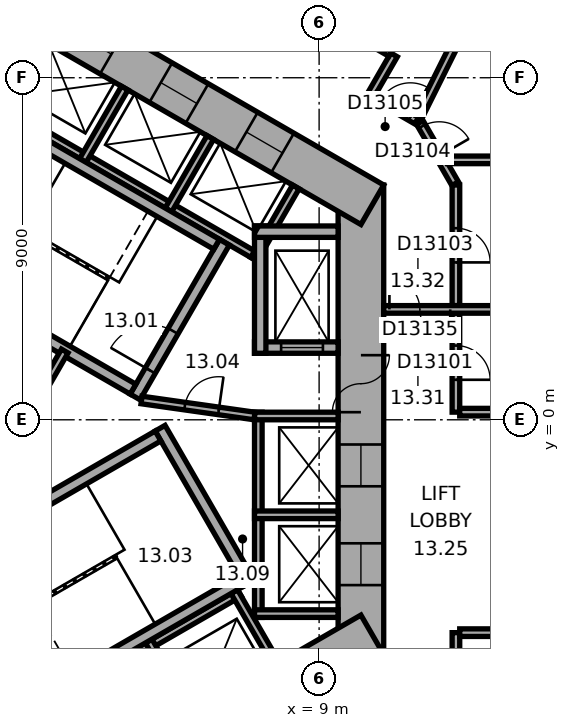
"""IFC4 building model, lengths in metres.
Left out: names, types, materials, properties, quantities, classifications, styles, units other than length and angle.
Written with IfcOpenShell. Run it as: python <this file> out.ifc"""

import sys

from ifc_helpers import new_model, si_unit, direction, frame, frame_2d, origin, place, context, subcontext, project, spatial, rectangle, extrude, element, fill, save


model = new_model("IFC4")
c1 = context("Model", 3, precision=1e-05, world=origin(), true_north=direction((0.0, 1.0)))
c2 = subcontext(c1, "Body", "Model", "MODEL_VIEW")
j1 = project(units=[si_unit("LENGTHUNIT", "METRE"), si_unit("PLANEANGLEUNIT", "RADIAN")], contexts=[c1])
p1 = place(None, origin())
s1 = spatial("IfcSite", under=j1, at=p1, CompositionType="ELEMENT")
p2 = place(p1, origin())
s2 = spatial("IfcBuilding", under=s1, at=p2, CompositionType="ELEMENT")
p3 = place(p2, frame((0.0, 0.0, 63.8)))
s3 = spatial("IfcBuildingStorey", under=s2, at=p3, CompositionType="ELEMENT", Elevation=63.8)
p4 = place(p3, frame((10.1, -6.177, 0.0), z_axis=(0.0, 0.0, 1.0), x_axis=(0.0, 1.0, 0.0)))
e1 = element("IfcWall", 1, at=p4, inside=s3, PredefinedType="SHEAR", context=c2, shape_type="SweptSolid", body=[
    extrude(rectangle(XDim=12.355, YDim=1.2, at=frame_2d((6.177, 0.0))), origin(), (0.0, 0.0, 1.0), 3.3),
])
p5 = place(p4, frame((6.378, 0.0, 0.0)))
e2 = element("IfcOpeningElement", 2, at=p5, cuts=e1, PredefinedType="OPENING", context=c2, shape_type="SweptSolid", body=[
    extrude(rectangle(XDim=1.5, YDim=2.1, at=frame_2d((0.75, 1.05))), frame((0.0, 0.61, 0.0), z_axis=(0.0, -1.0, 0.0), x_axis=(1.0, 0.0, 0.0)), (0.0, 0.0, 1.0), 1.22),
])
p6 = place(p4, frame((1.828, 0.0, 0.0)))
e3 = element("IfcOpeningElement", 3, at=p6, cuts=e1, PredefinedType="OPENING", context=c2, shape_type="SweptSolid", body=[
    extrude(rectangle(XDim=1.1, YDim=2.1, at=frame_2d((0.55, 1.05))), frame((0.0, 0.61, 0.0), z_axis=(0.0, -1.0, 0.0), x_axis=(1.0, 0.0, 0.0)), (0.0, 0.0, 1.0), 1.22),
])
p7 = place(p4, frame((4.427, 0.0, 0.0)))
e4 = element("IfcOpeningElement", 4, at=p7, cuts=e1, PredefinedType="OPENING", context=c2, shape_type="SweptSolid", body=[
    extrude(rectangle(XDim=1.1, YDim=2.1, at=frame_2d((0.55, 1.05))), frame((0.0, 0.61, 0.0), z_axis=(0.0, -1.0, 0.0), x_axis=(1.0, 0.0, 0.0)), (0.0, 0.0, 1.0), 1.22),
])
p8 = place(p3, frame((10.4, 5.658, 0.0), z_axis=(0.0, 0.0, 1.0), x_axis=(-0.866021384402, 0.500006961711, 0.0)))
e5 = element("IfcWall", 5, at=p8, inside=s3, PredefinedType="SHEAR", context=c2, shape_type="SweptSolid", body=[
    extrude(rectangle(XDim=12.355, YDim=1.2, at=frame_2d((6.178, 0.0))), origin(), (0.0, 0.0, 1.0), 3.3),
])
p9 = place(p8, frame((2.728, 0.0, 0.0)))
e6 = element("IfcOpeningElement", 6, at=p9, cuts=e5, PredefinedType="OPENING", context=c2, shape_type="SweptSolid", body=[
    extrude(rectangle(XDim=1.1, YDim=2.1, at=frame_2d((0.55, 1.05))), frame((0.0, 0.61, 0.0), z_axis=(0.0, -1.0, 0.0), x_axis=(1.0, 0.0, 0.0)), (0.0, 0.0, 1.0), 1.22),
])
p10 = place(p8, frame((5.328, 0.0, 0.0)))
e7 = element("IfcOpeningElement", 7, at=p10, cuts=e5, PredefinedType="OPENING", context=c2, shape_type="SweptSolid", body=[
    extrude(rectangle(XDim=1.1, YDim=2.1, at=frame_2d((0.55, 1.05))), frame((0.0, 0.61, 0.0), z_axis=(0.0, -1.0, 0.0), x_axis=(1.0, 0.0, 0.0)), (0.0, 0.0, 1.0), 1.22),
])
p11 = place(p8, frame((7.928, 0.0, 0.0)))
e8 = element("IfcOpeningElement", 8, at=p11, cuts=e5, PredefinedType="OPENING", context=c2, shape_type="SweptSolid", body=[
    extrude(rectangle(XDim=1.1, YDim=2.1, at=frame_2d((0.55, 1.05))), frame((0.0, 0.61, 0.0), z_axis=(0.0, -1.0, 0.0), x_axis=(1.0, 0.0, 0.0)), (0.0, 0.0, 1.0), 1.22),
])
p12 = place(p3, frame((-0.3, -11.836, 0.0), z_axis=(0.0, 0.0, 1.0), x_axis=(0.866021384402, 0.500006961711, 0.0)))
e9 = element("IfcWall", 9, at=p12, inside=s3, PredefinedType="SHEAR", context=c2, shape_type="SweptSolid", body=[
    extrude(rectangle(XDim=12.355, YDim=1.2, at=frame_2d((6.178, 0.0))), origin(), (0.0, 0.0, 1.0), 3.3),
])
p13 = place(p12, frame((4.128, 0.0, 0.0)))
e10 = element("IfcOpeningElement", 10, at=p13, cuts=e9, PredefinedType="OPENING", context=c2, shape_type="SweptSolid", body=[
    extrude(rectangle(XDim=0.9, YDim=2.1, at=frame_2d((0.45, 1.05))), frame((0.0, 0.61, 0.0), z_axis=(0.0, -1.0, 0.0), x_axis=(1.0, 0.0, 0.0)), (0.0, 0.0, 1.0), 1.22),
])
p14 = place(p12, frame((7.928, 0.0, 0.0)))
e11 = element("IfcOpeningElement", 11, at=p14, cuts=e9, PredefinedType="OPENING", context=c2, shape_type="SweptSolid", body=[
    extrude(rectangle(XDim=1.1, YDim=2.1, at=frame_2d((0.55, 1.05))), frame((0.0, 0.61, 0.0), z_axis=(0.0, -1.0, 0.0), x_axis=(1.0, 0.0, 0.0)), (0.0, 0.0, 1.0), 1.22),
])
p15 = place(p3, frame((7.4, -5.2, 0.0), z_axis=(0.0, 0.0, 1.0), x_axis=(0.0, 1.0, 0.0)))
e12 = element("IfcWall", 12, at=p15, inside=s3, PredefinedType="PARTITIONING", context=c2, shape_type="SweptSolid", body=[
    extrude(rectangle(XDim=5.4, YDim=0.2, at=frame_2d((2.7, 0.0))), origin(), (0.0, 0.0, 1.0), 3.05),
])
for number, where, z_axis, x_axis in (
    (13, (7.3, -5.1, 0.0), (0.0, 0.0, 1.0), (1.0, 0.0, 0.0)),
    (14, (7.3, -2.5, 0.0), (0.0, 0.0, 1.0), (1.0, 0.0, 0.0)),
    (15, (7.3, 0.1, 0.0), (0.0, 0.0, 1.0), (1.0, 0.0, 0.0)),
):
    element("IfcWall", number, at=place(p3, frame(where, z_axis=z_axis, x_axis=x_axis)), inside=s3, PredefinedType="PARTITIONING", context=c2, shape_type="SweptSolid", body=[
        extrude(rectangle(XDim=2.2, YDim=0.2, at=frame_2d((1.1, 0.0))), origin(), (0.0, 0.0, 1.0), 3.05),
    ])
p16 = place(p3, frame((7.424, 4.259, 0.0), z_axis=(0.0, 0.0, 1.0), x_axis=(-0.866026010844, 0.49999894854, 0.0)))
e16 = element("IfcWall", 16, at=p16, inside=s3, PredefinedType="PARTITIONING", context=c2, shape_type="SweptSolid", body=[
    extrude(rectangle(XDim=8.0, YDim=0.2, at=frame_2d((4.0, 0.0))), origin(), (0.0, 0.0, 1.0), 3.05),
])
for number, where, z_axis, x_axis in (
    (17, (7.287, 4.222, 0.0), (0.0, 0.0, 1.0), (0.5, 0.866, 0.0)),
    (18, (5.036, 5.522, 0.0), (0.0, 0.0, 1.0), (0.5, 0.866, 0.0)),
    (19, (2.784, 6.822, 0.0), (0.0, 0.0, 1.0), (0.5, 0.866, 0.0)),
):
    element("IfcWall", number, at=place(p3, frame(where, z_axis=z_axis, x_axis=x_axis)), inside=s3, PredefinedType="PARTITIONING", context=c2, shape_type="SweptSolid", body=[
        extrude(rectangle(XDim=2.2, YDim=0.2, at=frame_2d((1.1, 0.0))), origin(), (0.0, 0.0, 1.0), 3.05),
    ])
p17 = place(p3, frame((-0.024, -8.559, 0.0), z_axis=(0.0, 0.0, 1.0), x_axis=(0.866026010844, 0.49999894854, 0.0)))
e20 = element("IfcWall", 20, at=p17, inside=s3, PredefinedType="PARTITIONING", context=c2, shape_type="SweptSolid", body=[
    extrude(rectangle(XDim=8.0, YDim=0.2, at=frame_2d((4.0, 0.0))), origin(), (0.0, 0.0, 1.0), 3.05),
])
for number, where, z_axis, x_axis in (
    (21, (4.516, -5.822, 0.0), (0.0, 0.0, 1.0), (0.5, -0.866, 0.0)),
    (22, (6.768, -4.522, 0.0), (0.0, 0.0, 1.0), (0.5, -0.866, 0.0)),
):
    element("IfcWall", number, at=place(p3, frame(where, z_axis=z_axis, x_axis=x_axis)), inside=s3, PredefinedType="PARTITIONING", context=c2, shape_type="SweptSolid", body=[
        extrude(rectangle(XDim=2.2, YDim=0.2, at=frame_2d((1.1, 0.0))), origin(), (0.0, 0.0, 1.0), 3.05),
    ])
p18 = place(p3, frame((4.158, 0.602, 0.0), z_axis=(0.0, 0.0, 1.0), x_axis=(0.499977259774, 0.866038532462, 0.0)))
e23 = element("IfcWall", 23, at=p18, inside=s3, PredefinedType="SHEAR", context=c2, shape_type="SweptSolid", body=[
    extrude(rectangle(XDim=4.7, YDim=0.3, at=frame_2d((2.35, 0.0))), origin(), (0.0, 0.0, 1.0), 3.05),
])
p19 = place(p18, frame((0.8, 0.0, 0.0)))
e24 = element("IfcOpeningElement", 24, at=p19, cuts=e23, PredefinedType="OPENING", context=c2, shape_type="SweptSolid", body=[
    extrude(rectangle(XDim=1.2, YDim=2.1, at=frame_2d((0.6, 1.05))), frame((0.0, 0.16, 0.0), z_axis=(0.0, -1.0, 0.0), x_axis=(1.0, 0.0, 0.0)), (0.0, 0.0, 1.0), 0.32),
])
for number, where, z_axis, x_axis in (
    (25, (4.103, 0.807, 0.0), (0.0, 0.0, 1.0), (-0.866, 0.5, 0.0)),
    (26, (6.303, 4.617, 0.0), (0.0, 0.0, 1.0), (-0.866, 0.5, 0.0)),
):
    element("IfcWall", number, at=place(p3, frame(where, z_axis=z_axis, x_axis=x_axis)), inside=s3, PredefinedType="SHEAR", context=c2, shape_type="SweptSolid", body=[
        extrude(rectangle(XDim=7.06, YDim=0.3, at=frame_2d((3.53, 0.0))), origin(), (0.0, 0.0, 1.0), 3.05),
    ])
p20 = place(p3, frame((4.816, -0.222, 0.0), z_axis=(0.0, 0.0, 1.0), x_axis=(0.499977259774, -0.866038532462, 0.0)))
e27 = element("IfcWall", 27, at=p20, inside=s3, PredefinedType="SHEAR", context=c2, shape_type="SweptSolid", body=[
    extrude(rectangle(XDim=4.7, YDim=0.3, at=frame_2d((2.35, 0.0))), origin(), (0.0, 0.0, 1.0), 3.05),
])
for number, where, z_axis, x_axis in (
    (28, (-1.353, -3.957, 0.0), (0.0, 0.0, 1.0), (0.866, 0.5, 0.0)),
    (29, (0.847, -7.767, 0.0), (0.0, 0.0, 1.0), (0.866, 0.5, 0.0)),
):
    element("IfcWall", number, at=place(p3, frame(where, z_axis=z_axis, x_axis=x_axis)), inside=s3, PredefinedType="SHEAR", context=c2, shape_type="SweptSolid", body=[
        extrude(rectangle(XDim=7.06, YDim=0.3, at=frame_2d((3.53, 0.0))), origin(), (0.0, 0.0, 1.0), 3.05),
    ])
p21 = place(p3, frame((7.3, 1.9, 0.0), z_axis=(0.0, 0.0, 1.0), x_axis=(1.0, 0.0, 0.0)))
e30 = element("IfcWall", 30, at=p21, inside=s3, PredefinedType="SHEAR", context=c2, shape_type="SweptSolid", body=[
    extrude(rectangle(XDim=2.2, YDim=0.3, at=frame_2d((1.1, 0.0))), origin(), (0.0, 0.0, 1.0), 3.05),
])
p22 = place(p21, frame((0.7, 0.0, 0.0)))
e31 = element("IfcOpeningElement", 31, at=p22, cuts=e30, PredefinedType="OPENING", context=c2, shape_type="SweptSolid", body=[
    extrude(rectangle(XDim=1.1, YDim=2.1, at=frame_2d((0.55, 1.05))), frame((0.0, 0.16, 0.0), z_axis=(0.0, -1.0, 0.0), x_axis=(1.0, 0.0, 0.0)), (0.0, 0.0, 1.0), 0.32),
])
p23 = place(p3, frame((7.45, 1.75, 0.0), z_axis=(0.0, 0.0, 1.0), x_axis=(0.0, 1.0, 0.0)))
e32 = element("IfcWall", 32, at=p23, inside=s3, PredefinedType="SHEAR", context=c2, shape_type="SweptSolid", body=[
    extrude(rectangle(XDim=3.35, YDim=0.3, at=frame_2d((1.675, 0.0))), origin(), (0.0, 0.0, 1.0), 3.05),
])
p24 = place(p3, frame((7.3, 4.95, 0.0), z_axis=(0.0, 0.0, 1.0), x_axis=(1.0, 0.0, 0.0)))
e33 = element("IfcWall", 33, at=p24, inside=s3, PredefinedType="SHEAR", context=c2, shape_type="SweptSolid", body=[
    extrude(rectangle(XDim=2.2, YDim=0.3, at=frame_2d((1.1, 0.0))), origin(), (0.0, 0.0, 1.0), 3.05),
])
p25 = place(p3, frame((4.327, 0.521, 0.0), z_axis=(0.0, 0.0, 1.0), x_axis=(0.990124376366, -0.14019172346, 0.0)))
e34 = element("IfcWall", 34, at=p25, inside=s3, PredefinedType="PARTITIONING", context=c2, shape_type="SweptSolid", body=[
    extrude(rectangle(XDim=3.002, YDim=0.2, at=frame_2d((1.501, 0.0))), origin(), (0.0, 0.0, 1.0), 3.05),
])
p26 = place(p25, frame((1.15, 0.0, 0.0)))
e35 = element("IfcOpeningElement", 35, at=p26, cuts=e34, PredefinedType="OPENING", context=c2, shape_type="SweptSolid", body=[
    extrude(rectangle(XDim=0.9, YDim=2.1, at=frame_2d((0.45, 1.05))), frame((0.0, 0.11, 0.0), z_axis=(0.0, -1.0, 0.0), x_axis=(1.0, 0.0, 0.0)), (0.0, 0.0, 1.0), 0.22),
])
p27 = place(p3, frame((0.74, -0.904, 0.0), z_axis=(0.0, 0.0, 1.0), x_axis=(0.500028278809, 0.866009076391, 0.0)))
e36 = element("IfcWall", 36, at=p27, inside=s3, PredefinedType="PARTITIONING", context=c2, shape_type="SweptSolid", body=[
    extrude(rectangle(XDim=3.133, YDim=0.2, at=frame_2d((1.566, 0.0))), origin(), (0.0, 0.0, 1.0), 3.05),
])
p28 = place(p3, frame((10.371, 8.561, 0.0), z_axis=(0.0, 0.0, 1.0), x_axis=(0.499986357472, 0.866033280158, 0.0)))
e37 = element("IfcWall", 37, at=p28, inside=s3, PredefinedType="PARTITIONING", context=c2, shape_type="SweptSolid", body=[
    extrude(rectangle(XDim=1.201, YDim=0.2, at=frame_2d((0.601, 0.0))), origin(), (0.0, 0.0, 1.0), 3.05),
])
p29 = place(p3, frame((10.885, 9.652, 0.0), z_axis=(0.0, 0.0, 1.0), x_axis=(-0.866033868542, 0.499985338323, 0.0)))
e38 = element("IfcWall", 38, at=p29, inside=s3, PredefinedType="PARTITIONING", context=c2, shape_type="SweptSolid", body=[
    extrude(rectangle(XDim=8.602, YDim=0.2, at=frame_2d((4.301, 0.0))), origin(), (0.0, 0.0, 1.0), 3.05),
])
p30 = place(p29, frame((5.302, 0.0, 0.0)))
e39 = element("IfcOpeningElement", 39, at=p30, cuts=e38, PredefinedType="OPENING", context=c2, shape_type="SweptSolid", body=[
    extrude(rectangle(XDim=0.9, YDim=2.1, at=frame_2d((0.45, 1.05))), frame((0.0, 0.11, 0.0), z_axis=(0.0, -1.0, 0.0), x_axis=(1.0, 0.0, 0.0)), (0.0, 0.0, 1.0), 0.22),
])
p31 = place(p3, frame((11.566, 7.871, 0.0), z_axis=(0.0, 0.0, 1.0), x_axis=(-0.866004557827, 0.500036104519, 0.0)))
e40 = element("IfcWall", 40, at=p31, inside=s3, PredefinedType="PARTITIONING", context=c2, shape_type="SweptSolid", body=[
    extrude(rectangle(XDim=1.28, YDim=0.2, at=frame_2d((0.64, 0.0))), origin(), (0.0, 0.0, 1.0), 3.05),
])
p32 = place(p31, frame((0.19, 0.0, 0.0)))
e41 = element("IfcOpeningElement", 41, at=p32, cuts=e40, PredefinedType="OPENING", context=c2, shape_type="SweptSolid", body=[
    extrude(rectangle(XDim=0.9, YDim=2.1, at=frame_2d((0.45, 1.05))), frame((0.0, 0.11, 0.0), z_axis=(0.0, -1.0, 0.0), x_axis=(1.0, 0.0, 0.0)), (0.0, 0.0, 1.0), 0.22),
])
p33 = place(p3, frame((12.58, 6.212, 0.0), z_axis=(0.0, 0.0, 1.0), x_axis=(-0.500063286585, 0.865988862174, 0.0)))
e42 = element("IfcWall", 42, at=p33, inside=s3, PredefinedType="PARTITIONING", context=c2, shape_type="SweptSolid", body=[
    extrude(rectangle(XDim=1.86, YDim=0.2, at=frame_2d((0.93, 0.0))), origin(), (0.0, 0.0, 1.0), 3.05),
])
p34 = place(p33, frame((0.842, 0.0, 0.0)))
e43 = element("IfcOpeningElement", 43, at=p34, cuts=e42, PredefinedType="OPENING", context=c2, shape_type="SweptSolid", body=[
    extrude(rectangle(XDim=0.9, YDim=2.1, at=frame_2d((0.45, 1.05))), frame((0.0, 0.11, 0.0), z_axis=(0.0, -1.0, 0.0), x_axis=(1.0, 0.0, 0.0)), (0.0, 0.0, 1.0), 0.22),
])
p35 = place(p3, frame((12.6, -6.138, 0.0), z_axis=(0.0, 0.0, 1.0), x_axis=(0.0, 1.0, 0.0)))
e44 = element("IfcWall", 44, at=p35, inside=s3, PredefinedType="PARTITIONING", context=c2, shape_type="SweptSolid", body=[
    extrude(rectangle(XDim=0.537, YDim=0.2, at=frame_2d((0.268, 0.0))), origin(), (0.0, 0.0, 1.0), 3.05),
])
p36 = place(p3, frame((12.6, 0.201, 0.0), z_axis=(0.0, 0.0, 1.0), x_axis=(0.0, 1.0, 0.0)))
e45 = element("IfcWall", 45, at=p36, inside=s3, PredefinedType="PARTITIONING", context=c2, shape_type="SweptSolid", body=[
    extrude(rectangle(XDim=2.604, YDim=0.2, at=frame_2d((1.302, 0.0))), origin(), (0.0, 0.0, 1.0), 3.05),
])
p37 = place(p36, frame((0.852, 0.0, 0.0)))
e46 = element("IfcOpeningElement", 46, at=p37, cuts=e45, PredefinedType="OPENING", context=c2, shape_type="SweptSolid", body=[
    extrude(rectangle(XDim=0.9, YDim=2.1, at=frame_2d((0.45, 1.05))), frame((0.0, 0.11, 0.0), z_axis=(0.0, -1.0, 0.0), x_axis=(1.0, 0.0, 0.0)), (0.0, 0.0, 1.0), 0.22),
])
p38 = place(p3, frame((12.6, 3.004, 0.0), z_axis=(0.0, 0.0, 1.0), x_axis=(0.0, 1.0, 0.0)))
e47 = element("IfcWall", 47, at=p38, inside=s3, PredefinedType="PARTITIONING", context=c2, shape_type="SweptSolid", body=[
    extrude(rectangle(XDim=3.173, YDim=0.2, at=frame_2d((1.586, 0.0))), origin(), (0.0, 0.0, 1.0), 3.05),
])
p39 = place(p38, frame((1.136, 0.0, 0.0)))
e48 = element("IfcOpeningElement", 48, at=p39, cuts=e47, PredefinedType="OPENING", context=c2, shape_type="SweptSolid", body=[
    extrude(rectangle(XDim=0.9, YDim=2.1, at=frame_2d((0.45, 1.05))), frame((0.0, 0.11, 0.0), z_axis=(0.0, -1.0, 0.0), x_axis=(1.0, 0.0, 0.0)), (0.0, 0.0, 1.0), 0.22),
])
p40 = place(p3, frame((12.7, -5.601, 0.0), z_axis=(0.0, 0.0, 1.0), x_axis=(1.0, 0.0, 0.0)))
e49 = element("IfcWall", 49, at=p40, inside=s3, PredefinedType="PARTITIONING", context=c2, shape_type="SweptSolid", body=[
    extrude(rectangle(XDim=1.101, YDim=0.2, at=frame_2d((0.551, 0.0))), origin(), (0.0, 0.0, 1.0), 3.05),
])
p41 = place(p3, frame((13.701, 0.201, 0.0), z_axis=(0.0, 0.0, 1.0), x_axis=(-1.0, 0.0, 0.0)))
e50 = element("IfcWall", 50, at=p41, inside=s3, PredefinedType="PARTITIONING", context=c2, shape_type="SweptSolid", body=[
    extrude(rectangle(XDim=1.001, YDim=0.2, at=frame_2d((0.5, 0.0))), origin(), (0.0, 0.0, 1.0), 3.05),
])
p42 = place(p3, frame((15.915, 16.592, 0.0), z_axis=(0.0, 0.0, 1.0), x_axis=(-0.446199736347, -0.894933402709, 0.0)))
e51 = element("IfcWall", 51, at=p42, inside=s3, PredefinedType="PARTITIONING", context=c2, shape_type="SweptSolid", body=[
    extrude(rectangle(XDim=9.635, YDim=0.2, at=frame_2d((4.817, 0.0))), origin(), (0.0, 0.0, 1.0), 3.05),
])
p43 = place(p3, frame((21.95, 2.905, 0.0), z_axis=(0.0, 0.0, 1.0), x_axis=(-1.0, 0.0, 0.0)))
e52 = element("IfcWall", 52, at=p43, inside=s3, PredefinedType="PARTITIONING", context=c2, shape_type="SweptSolid", body=[
    extrude(rectangle(XDim=11.25, YDim=0.2, at=frame_2d((5.625, 0.0))), origin(), (0.0, 0.0, 1.0), 3.05),
])
p44 = place(p43, frame((9.5, 0.0, 0.0)))
e53 = element("IfcOpeningElement", 53, at=p44, cuts=e52, PredefinedType="OPENING", context=c2, shape_type="SweptSolid", body=[
    extrude(rectangle(XDim=1.6, YDim=2.1, at=frame_2d((0.8, 1.05))), frame((0.0, 0.11, 0.0), z_axis=(0.0, -1.0, 0.0), x_axis=(1.0, 0.0, 0.0)), (0.0, 0.0, 1.0), 0.22),
])
p45 = place(p3, frame((21.95, 6.839, 0.0), z_axis=(0.0, 0.0, 1.0), x_axis=(-1.0, 0.0, 0.0)))
e54 = element("IfcWall", 54, at=p45, inside=s3, PredefinedType="PARTITIONING", context=c2, shape_type="SweptSolid", body=[
    extrude(rectangle(XDim=9.572, YDim=0.2, at=frame_2d((4.786, 0.0))), origin(), (0.0, 0.0, 1.0), 3.05),
])
p46 = place(p5, origin())
e55 = element("IfcDoor", 55, at=p46, inside=s3, OperationType="DOUBLE_DOOR_SINGLE_SWING", PredefinedType="DOOR", context=c2, shape_type="SweptSolid", body=[
    extrude(rectangle(XDim=1.5, YDim=2.1, at=frame_2d((0.75, 1.05))), frame((0.0, 0.025, 0.0), z_axis=(0.0, -1.0, 0.0), x_axis=(1.0, 0.0, 0.0)), (0.0, 0.0, 1.0), 0.05),
])
fill(e2, e55)
p47 = place(p19, origin())
e56 = element("IfcDoor", 56, at=p47, inside=s3, OperationType="SINGLE_SWING_RIGHT", PredefinedType="DOOR", context=c2, shape_type="SweptSolid", body=[
    extrude(rectangle(XDim=1.2, YDim=2.1, at=frame_2d((0.6, 1.05))), frame((0.0, 0.025, 0.0), z_axis=(0.0, -1.0, 0.0), x_axis=(1.0, 0.0, 0.0)), (0.0, 0.0, 1.0), 0.05),
])
fill(e24, e56)
p48 = place(p26, origin())
e57 = element("IfcDoor", 57, at=p48, inside=s3, OperationType="SINGLE_SWING_LEFT", PredefinedType="DOOR", context=c2, shape_type="SweptSolid", body=[
    extrude(rectangle(XDim=0.9, YDim=2.1, at=frame_2d((0.45, 1.05))), frame((0.0, 0.025, 0.0), z_axis=(0.0, -1.0, 0.0), x_axis=(1.0, 0.0, 0.0)), (0.0, 0.0, 1.0), 0.05),
])
fill(e35, e57)
p49 = place(p22, origin())
e58 = element("IfcDoor", 58, at=p49, inside=s3, OperationType="DOUBLE_DOOR_SLIDING", PredefinedType="DOOR", context=c2, shape_type="SweptSolid", body=[
    extrude(rectangle(XDim=1.1, YDim=2.1, at=frame_2d((0.55, 1.05))), frame((0.0, 0.025, 0.0), z_axis=(0.0, -1.0, 0.0), x_axis=(1.0, 0.0, 0.0)), (0.0, 0.0, 1.0), 0.05),
])
fill(e31, e58)
p50 = place(p6, origin())
e59 = element("IfcDoor", 59, at=p50, inside=s3, OperationType="DOUBLE_DOOR_SLIDING", PredefinedType="DOOR", context=c2, shape_type="SweptSolid", body=[
    extrude(rectangle(XDim=1.1, YDim=2.1, at=frame_2d((0.55, 1.05))), frame((0.0, 0.025, 0.0), z_axis=(0.0, -1.0, 0.0), x_axis=(1.0, 0.0, 0.0)), (0.0, 0.0, 1.0), 0.05),
])
fill(e3, e59)
p51 = place(p7, origin())
e60 = element("IfcDoor", 60, at=p51, inside=s3, OperationType="DOUBLE_DOOR_SLIDING", PredefinedType="DOOR", context=c2, shape_type="SweptSolid", body=[
    extrude(rectangle(XDim=1.1, YDim=2.1, at=frame_2d((0.55, 1.05))), frame((0.0, 0.025, 0.0), z_axis=(0.0, -1.0, 0.0), x_axis=(1.0, 0.0, 0.0)), (0.0, 0.0, 1.0), 0.05),
])
fill(e4, e60)
p52 = place(p9, origin())
e61 = element("IfcDoor", 61, at=p52, inside=s3, OperationType="DOUBLE_DOOR_SLIDING", PredefinedType="DOOR", context=c2, shape_type="SweptSolid", body=[
    extrude(rectangle(XDim=1.1, YDim=2.1, at=frame_2d((0.55, 1.05))), frame((0.0, 0.025, 0.0), z_axis=(0.0, -1.0, 0.0), x_axis=(1.0, 0.0, 0.0)), (0.0, 0.0, 1.0), 0.05),
])
fill(e6, e61)
p53 = place(p10, origin())
e62 = element("IfcDoor", 62, at=p53, inside=s3, OperationType="DOUBLE_DOOR_SLIDING", PredefinedType="DOOR", context=c2, shape_type="SweptSolid", body=[
    extrude(rectangle(XDim=1.1, YDim=2.1, at=frame_2d((0.55, 1.05))), frame((0.0, 0.025, 0.0), z_axis=(0.0, -1.0, 0.0), x_axis=(1.0, 0.0, 0.0)), (0.0, 0.0, 1.0), 0.05),
])
fill(e7, e62)
p54 = place(p11, origin())
e63 = element("IfcDoor", 63, at=p54, inside=s3, OperationType="DOUBLE_DOOR_SLIDING", PredefinedType="DOOR", context=c2, shape_type="SweptSolid", body=[
    extrude(rectangle(XDim=1.1, YDim=2.1, at=frame_2d((0.55, 1.05))), frame((0.0, 0.025, 0.0), z_axis=(0.0, -1.0, 0.0), x_axis=(1.0, 0.0, 0.0)), (0.0, 0.0, 1.0), 0.05),
])
fill(e8, e63)
p55 = place(p37, origin())
e64 = element("IfcDoor", 64, at=p55, inside=s3, OperationType="SINGLE_SWING_LEFT", PredefinedType="DOOR", context=c2, shape_type="SweptSolid", body=[
    extrude(rectangle(XDim=0.9, YDim=2.1, at=frame_2d((0.45, 1.05))), frame((0.0, 0.025, 0.0), z_axis=(0.0, -1.0, 0.0), x_axis=(1.0, 0.0, 0.0)), (0.0, 0.0, 1.0), 0.05),
])
fill(e46, e64)
p56 = place(p39, origin())
e65 = element("IfcDoor", 65, at=p56, inside=s3, OperationType="SINGLE_SWING_LEFT", PredefinedType="DOOR", context=c2, shape_type="SweptSolid", body=[
    extrude(rectangle(XDim=0.9, YDim=2.1, at=frame_2d((0.45, 1.05))), frame((0.0, 0.025, 0.0), z_axis=(0.0, -1.0, 0.0), x_axis=(1.0, 0.0, 0.0)), (0.0, 0.0, 1.0), 0.05),
])
fill(e48, e65)
p57 = place(p34, origin())
e66 = element("IfcDoor", 66, at=p57, inside=s3, OperationType="SINGLE_SWING_LEFT", PredefinedType="DOOR", context=c2, shape_type="SweptSolid", body=[
    extrude(rectangle(XDim=0.9, YDim=2.1, at=frame_2d((0.45, 1.05))), frame((0.0, 0.025, 0.0), z_axis=(0.0, -1.0, 0.0), x_axis=(1.0, 0.0, 0.0)), (0.0, 0.0, 1.0), 0.05),
])
fill(e43, e66)
p58 = place(p32, origin())
e67 = element("IfcDoor", 67, at=p58, inside=s3, OperationType="SINGLE_SWING_LEFT", PredefinedType="DOOR", context=c2, shape_type="SweptSolid", body=[
    extrude(rectangle(XDim=0.9, YDim=2.1, at=frame_2d((0.45, 1.05))), frame((0.0, 0.025, 0.0), z_axis=(0.0, -1.0, 0.0), x_axis=(1.0, 0.0, 0.0)), (0.0, 0.0, 1.0), 0.05),
])
fill(e41, e67)
p59 = place(p44, origin())
e68 = element("IfcDoor", 68, at=p59, inside=s3, OperationType="DOUBLE_DOOR_SINGLE_SWING", PredefinedType="DOOR", context=c2, shape_type="SweptSolid", body=[
    extrude(rectangle(XDim=1.6, YDim=2.1, at=frame_2d((0.8, 1.05))), frame((0.0, 0.025, 0.0), z_axis=(0.0, -1.0, 0.0), x_axis=(1.0, 0.0, 0.0)), (0.0, 0.0, 1.0), 0.05),
])
fill(e53, e68)
save(model, sys.argv[1])
